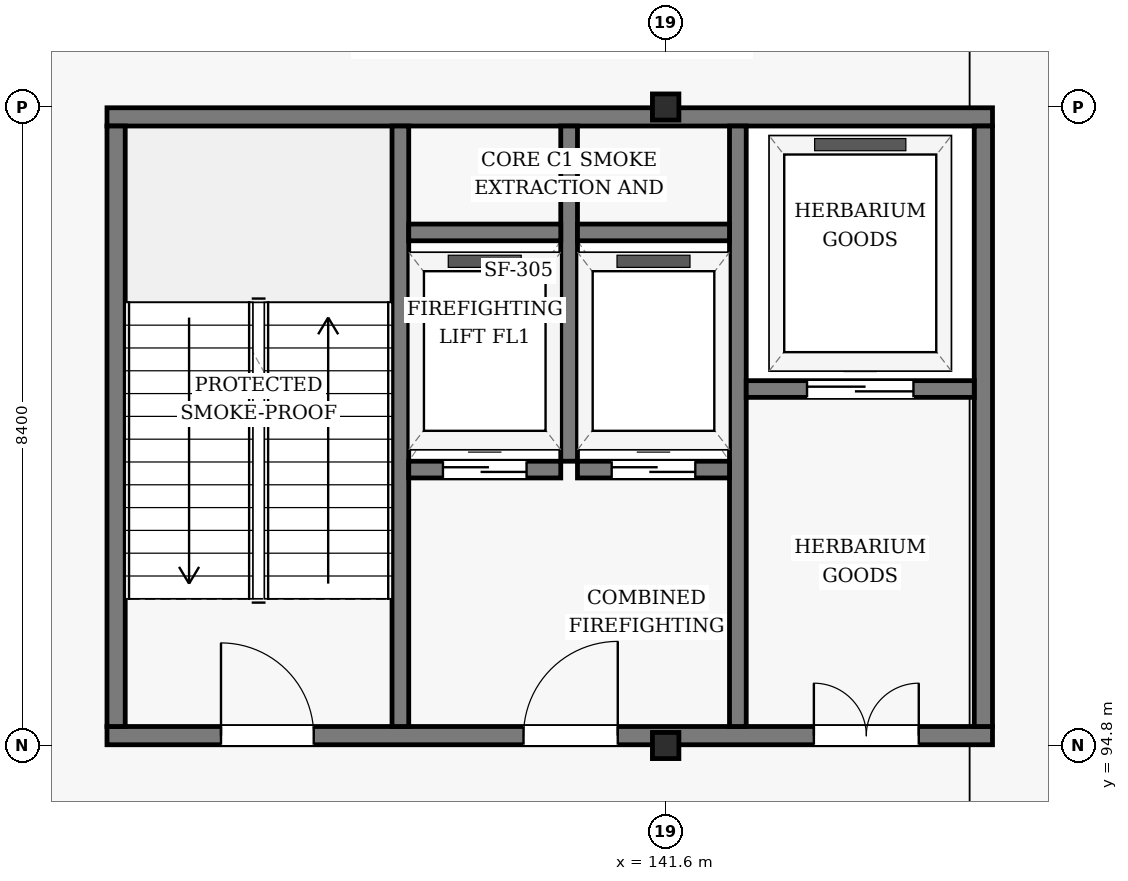
"""IFC4 building model, lengths in metres.
Left out: names, types, materials, properties, quantities, classifications, styles, units other than length and angle.
Written with IfcOpenShell. Run it as: python <this file> out.ifc"""

import sys

from ifc_helpers import new_model, si_unit, direction, frame, frame_2d, origin, origin_2d, place, context, subcontext, project, spatial, rectangle, i_section, extrude, element, fill, save


model = new_model("IFC4")
c1 = context("Model", 3, precision=1e-05, world=origin(), true_north=direction((0.0, 1.0)))
c2 = subcontext(c1, "Body", "Model", "MODEL_VIEW")
j1 = project(units=[si_unit("LENGTHUNIT", "METRE"), si_unit("PLANEANGLEUNIT", "RADIAN")], contexts=[c1])
p1 = place(None, origin())
s1 = spatial("IfcSite", under=j1, at=p1, CompositionType="ELEMENT")
p2 = place(p1, origin())
s2 = spatial("IfcBuilding", under=s1, at=p2, CompositionType="ELEMENT")
p3 = place(p2, frame((0.0, 0.0, 35.4)))
s3 = spatial("IfcBuildingStorey", under=s2, at=p3, CompositionType="ELEMENT", Elevation=35.4)
for number, where, z_axis, x_axis in (
    (1, (141.6, 94.8, 0.0), (0.0, 0.0, 1.0), (1.0, 0.0, 0.0)),
    (2, (141.6, 103.2, 0.0), (0.0, 0.0, 1.0), (1.0, 0.0, 0.0)),
):
    element("IfcColumn", number, at=place(p3, frame(where, z_axis=z_axis, x_axis=x_axis)), inside=s3, PredefinedType="COLUMN", context=c2, shape_type="SweptSolid", body=[
        extrude(i_section(OverallWidth=0.348, OverallDepth=0.344, WebThickness=0.01, FlangeThickness=0.016, FilletRadius=0.02, at=origin_2d()), origin(), (0.0, 0.0, 1.0), 4.2),
    ])
p4 = place(p3, frame((134.25, 94.93, 0.0), z_axis=(0.0, 0.0, 1.0), x_axis=(1.0, 0.0, 0.0)))
e3 = element("IfcWall", 3, at=p4, inside=s3, PredefinedType="SHEAR", context=c2, shape_type="SweptSolid", body=[
    extrude(rectangle(XDim=11.65, YDim=0.24, at=frame_2d((5.825, 0.0))), origin(), (0.0, 0.0, 1.0), 3.948),
])
p5 = place(p4, frame((1.5, 0.0, 0.0)))
e4 = element("IfcOpeningElement", 4, at=p5, cuts=e3, PredefinedType="OPENING", context=c2, shape_type="SweptSolid", body=[
    extrude(rectangle(XDim=1.22, YDim=2.18, at=frame_2d((0.61, 1.09))), frame((0.0, 0.13, 0.0), z_axis=(0.0, -1.0, 0.0), x_axis=(1.0, 0.0, 0.0)), (0.0, 0.0, 1.0), 0.26),
])
p6 = place(p4, frame((5.48, 0.0, 0.0)))
e5 = element("IfcOpeningElement", 5, at=p6, cuts=e3, PredefinedType="OPENING", context=c2, shape_type="SweptSolid", body=[
    extrude(rectangle(XDim=1.24, YDim=2.15, at=frame_2d((0.62, 1.075))), frame((0.0, 0.13, 0.0), z_axis=(0.0, -1.0, 0.0), x_axis=(1.0, 0.0, 0.0)), (0.0, 0.0, 1.0), 0.26),
])
p7 = place(p4, frame((9.3, 0.0, 0.0)))
e6 = element("IfcOpeningElement", 6, at=p7, cuts=e3, PredefinedType="OPENING", context=c2, shape_type="SweptSolid", body=[
    extrude(rectangle(XDim=1.38, YDim=2.15, at=frame_2d((0.69, 1.075))), frame((0.0, 0.13, 0.0), z_axis=(0.0, -1.0, 0.0), x_axis=(1.0, 0.0, 0.0)), (0.0, 0.0, 1.0), 0.26),
])
p8 = place(p3, frame((134.25, 103.07, 0.0), z_axis=(0.0, 0.0, 1.0), x_axis=(1.0, 0.0, 0.0)))
e7 = element("IfcWall", 7, at=p8, inside=s3, PredefinedType="SHEAR", context=c2, shape_type="SweptSolid", body=[
    extrude(rectangle(XDim=11.65, YDim=0.24, at=frame_2d((5.825, 0.0))), origin(), (0.0, 0.0, 1.0), 3.948),
])
p9 = place(p3, frame((134.37, 95.05, 0.0), z_axis=(0.0, 0.0, 1.0), x_axis=(0.0, 1.0, 0.0)))
e8 = element("IfcWall", 8, at=p9, inside=s3, PredefinedType="SHEAR", context=c2, shape_type="SweptSolid", body=[
    extrude(rectangle(XDim=7.9, YDim=0.24, at=frame_2d((3.95, 0.0))), origin(), (0.0, 0.0, 1.0), 3.948),
])
p10 = place(p3, frame((138.11, 95.05, 0.0), z_axis=(0.0, 0.0, 1.0), x_axis=(0.0, 1.0, 0.0)))
e9 = element("IfcWall", 9, at=p10, inside=s3, PredefinedType="SHEAR", context=c2, shape_type="SweptSolid", body=[
    extrude(rectangle(XDim=7.9, YDim=0.22, at=frame_2d((3.95, 0.0))), origin(), (0.0, 0.0, 1.0), 3.948),
])
p11 = place(p3, frame((140.33, 98.54, 0.0), z_axis=(0.0, 0.0, 1.0), x_axis=(0.0, 1.0, 0.0)))
e10 = element("IfcWall", 10, at=p11, inside=s3, PredefinedType="SHEAR", context=c2, shape_type="SweptSolid", body=[
    extrude(rectangle(XDim=4.41, YDim=0.22, at=frame_2d((2.205, 0.0))), origin(), (0.0, 0.0, 1.0), 3.948),
])
p12 = place(p3, frame((142.55, 95.05, 0.0), z_axis=(0.0, 0.0, 1.0), x_axis=(0.0, 1.0, 0.0)))
e11 = element("IfcWall", 11, at=p12, inside=s3, PredefinedType="SHEAR", context=c2, shape_type="SweptSolid", body=[
    extrude(rectangle(XDim=7.9, YDim=0.22, at=frame_2d((3.95, 0.0))), origin(), (0.0, 0.0, 1.0), 3.948),
])
p13 = place(p3, frame((145.78, 95.05, 0.0), z_axis=(0.0, 0.0, 1.0), x_axis=(0.0, 1.0, 0.0)))
e12 = element("IfcWall", 12, at=p13, inside=s3, PredefinedType="SHEAR", context=c2, shape_type="SweptSolid", body=[
    extrude(rectangle(XDim=7.9, YDim=0.24, at=frame_2d((3.95, 0.0))), origin(), (0.0, 0.0, 1.0), 3.948),
])
p14 = place(p3, frame((138.22, 98.43, 0.0), z_axis=(0.0, 0.0, 1.0), x_axis=(1.0, 0.0, 0.0)))
e13 = element("IfcWall", 13, at=p14, inside=s3, PredefinedType="SHEAR", context=c2, shape_type="SweptSolid", body=[
    extrude(rectangle(XDim=2.0, YDim=0.22, at=frame_2d((1.0, 0.0))), origin(), (0.0, 0.0, 1.0), 3.948),
])
p15 = place(p14, frame((0.45, 0.0, 0.0)))
e14 = element("IfcOpeningElement", 14, at=p15, cuts=e13, PredefinedType="OPENING", context=c2, shape_type="SweptSolid", body=[
    extrude(rectangle(XDim=1.1, YDim=2.15, at=frame_2d((0.55, 1.075))), frame((0.0, 0.12, 0.0), z_axis=(0.0, -1.0, 0.0), x_axis=(1.0, 0.0, 0.0)), (0.0, 0.0, 1.0), 0.24),
])
p16 = place(p3, frame((140.44, 98.43, 0.0), z_axis=(0.0, 0.0, 1.0), x_axis=(1.0, 0.0, 0.0)))
e15 = element("IfcWall", 15, at=p16, inside=s3, PredefinedType="SHEAR", context=c2, shape_type="SweptSolid", body=[
    extrude(rectangle(XDim=2.0, YDim=0.22, at=frame_2d((1.0, 0.0))), origin(), (0.0, 0.0, 1.0), 3.948),
])
p17 = place(p16, frame((0.45, 0.0, 0.0)))
e16 = element("IfcOpeningElement", 16, at=p17, cuts=e15, PredefinedType="OPENING", context=c2, shape_type="SweptSolid", body=[
    extrude(rectangle(XDim=1.1, YDim=2.15, at=frame_2d((0.55, 1.075))), frame((0.0, 0.12, 0.0), z_axis=(0.0, -1.0, 0.0), x_axis=(1.0, 0.0, 0.0)), (0.0, 0.0, 1.0), 0.24),
])
for number, where, z_axis, x_axis in (
    (17, (138.22, 101.55, 0.0), (0.0, 0.0, 1.0), (1.0, 0.0, 0.0)),
    (18, (140.44, 101.55, 0.0), (0.0, 0.0, 1.0), (1.0, 0.0, 0.0)),
):
    element("IfcWall", number, at=place(p3, frame(where, z_axis=z_axis, x_axis=x_axis)), inside=s3, PredefinedType="SHEAR", context=c2, shape_type="SweptSolid", body=[
        extrude(rectangle(XDim=2.0, YDim=0.22, at=frame_2d((1.0, 0.0))), origin(), (0.0, 0.0, 1.0), 3.948),
    ])
p18 = place(p3, frame((142.66, 99.49, 0.0), z_axis=(0.0, 0.0, 1.0), x_axis=(1.0, 0.0, 0.0)))
e19 = element("IfcWall", 19, at=p18, inside=s3, PredefinedType="SHEAR", context=c2, shape_type="SweptSolid", body=[
    extrude(rectangle(XDim=3.0, YDim=0.22, at=frame_2d((1.5, 0.0))), origin(), (0.0, 0.0, 1.0), 3.948),
])
p19 = place(p18, frame((0.8, 0.0, 0.0)))
e20 = element("IfcOpeningElement", 20, at=p19, cuts=e19, PredefinedType="OPENING", context=c2, shape_type="SweptSolid", body=[
    extrude(rectangle(XDim=1.4, YDim=2.2, at=frame_2d((0.7, 1.1))), frame((0.0, 0.12, 0.0), z_axis=(0.0, -1.0, 0.0), x_axis=(1.0, 0.0, 0.0)), (0.0, 0.0, 1.0), 0.24),
])
p20 = place(p5, origin())
e21 = element("IfcDoor", 21, at=p20, inside=s3, OperationType="SINGLE_SWING_LEFT", PredefinedType="DOOR", context=c2, shape_type="SweptSolid", body=[
    extrude(rectangle(XDim=1.22, YDim=2.18, at=frame_2d((0.61, 1.09))), frame((0.0, 0.025, 0.0), z_axis=(0.0, -1.0, 0.0), x_axis=(1.0, 0.0, 0.0)), (0.0, 0.0, 1.0), 0.05),
])
fill(e4, e21)
p21 = place(p6, frame((1.24, 0.0, 0.0), z_axis=(0.0, 0.0, 1.0), x_axis=(-1.0, 0.0, 0.0)))
e22 = element("IfcDoor", 22, at=p21, inside=s3, OperationType="SINGLE_SWING_RIGHT", PredefinedType="DOOR", context=c2, shape_type="SweptSolid", body=[
    extrude(rectangle(XDim=1.24, YDim=2.15, at=frame_2d((0.62, 1.075))), frame((0.0, 0.025, 0.0), z_axis=(0.0, -1.0, 0.0), x_axis=(1.0, 0.0, 0.0)), (0.0, 0.0, 1.0), 0.05),
])
fill(e5, e22)
p22 = place(p7, frame((1.38, 0.0, 0.0), z_axis=(0.0, 0.0, 1.0), x_axis=(-1.0, 0.0, 0.0)))
e23 = element("IfcDoor", 23, at=p22, inside=s3, OperationType="DOUBLE_DOOR_SINGLE_SWING", PredefinedType="DOOR", context=c2, shape_type="SweptSolid", body=[
    extrude(rectangle(XDim=1.38, YDim=2.15, at=frame_2d((0.69, 1.075))), frame((0.0, 0.025, 0.0), z_axis=(0.0, -1.0, 0.0), x_axis=(1.0, 0.0, 0.0)), (0.0, 0.0, 1.0), 0.05),
])
fill(e6, e23)
p23 = place(p15, origin())
e24 = element("IfcDoor", 24, at=p23, inside=s3, OperationType="SLIDING_TO_LEFT", PredefinedType="DOOR", context=c2, shape_type="SweptSolid", body=[
    extrude(rectangle(XDim=1.1, YDim=2.15, at=frame_2d((0.55, 1.075))), frame((0.0, 0.025, 0.0), z_axis=(0.0, -1.0, 0.0), x_axis=(1.0, 0.0, 0.0)), (0.0, 0.0, 1.0), 0.05),
])
fill(e14, e24)
p24 = place(p17, origin())
e25 = element("IfcDoor", 25, at=p24, inside=s3, OperationType="SLIDING_TO_LEFT", PredefinedType="DOOR", context=c2, shape_type="SweptSolid", body=[
    extrude(rectangle(XDim=1.1, YDim=2.15, at=frame_2d((0.55, 1.075))), frame((0.0, 0.025, 0.0), z_axis=(0.0, -1.0, 0.0), x_axis=(1.0, 0.0, 0.0)), (0.0, 0.0, 1.0), 0.05),
])
fill(e16, e25)
p25 = place(p19, origin())
e26 = element("IfcDoor", 26, at=p25, inside=s3, OperationType="SLIDING_TO_LEFT", PredefinedType="DOOR", context=c2, shape_type="SweptSolid", body=[
    extrude(rectangle(XDim=1.4, YDim=2.2, at=frame_2d((0.7, 1.1))), frame((0.0, 0.025, 0.0), z_axis=(0.0, -1.0, 0.0), x_axis=(1.0, 0.0, 0.0)), (0.0, 0.0, 1.0), 0.05),
])
fill(e20, e26)
save(model, sys.argv[1])
